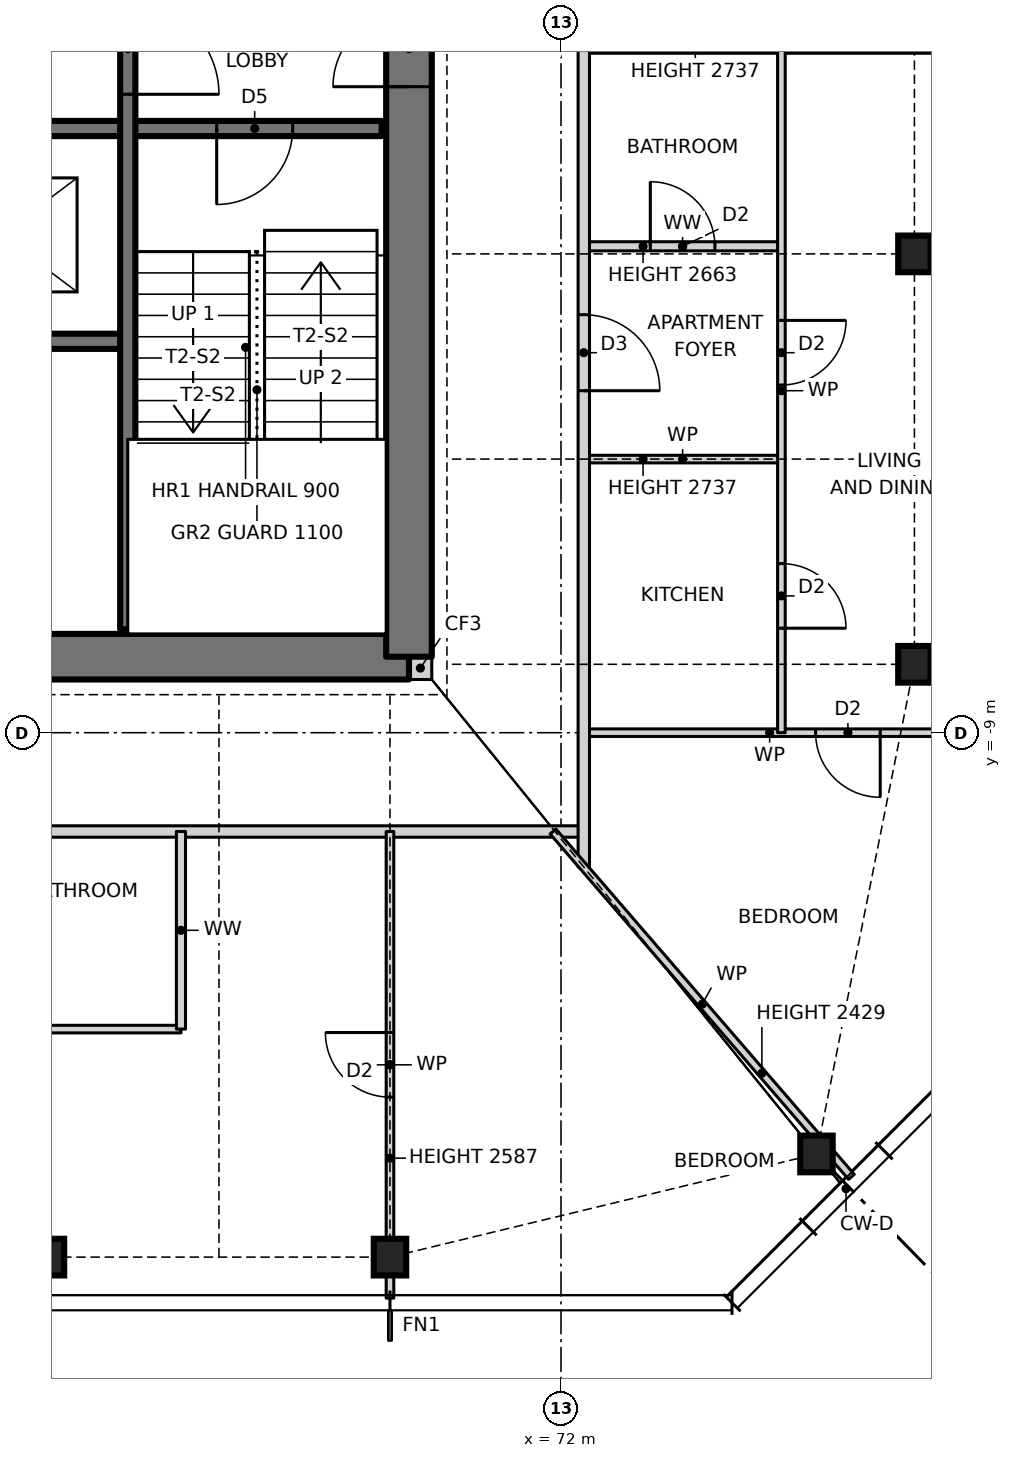
"""IFC4 building model, lengths in metres.
Left out: names, types, materials, properties, quantities, classifications, styles, units other than length and angle.
Written with IfcOpenShell. Run it as: python <this file> out.ifc"""

import sys

from ifc_helpers import new_model, si_unit, direction, frame, frame_2d, origin, origin_2d, place, context, subcontext, project, spatial, rectangle, i_section, extrude, element, fill, save


model = new_model("IFC4")
c1 = context("Model", 3, precision=1e-05, world=origin(), true_north=direction((0.0, 1.0)))
c2 = subcontext(c1, "Body", "Model", "MODEL_VIEW")
j1 = project(units=[si_unit("LENGTHUNIT", "METRE"), si_unit("PLANEANGLEUNIT", "RADIAN")], contexts=[c1])
p1 = place(None, origin())
s1 = spatial("IfcSite", under=j1, at=p1, CompositionType="ELEMENT")
p2 = place(p1, origin())
s2 = spatial("IfcBuilding", under=s1, at=p2, CompositionType="ELEMENT")
p3 = place(p2, frame((0.0, 0.0, 108.5)))
s3 = spatial("IfcBuildingStorey", under=s2, at=p3, CompositionType="ELEMENT", Elevation=108.5)
for number, where, z_axis, x_axis in (
    (1, (65.25, -15.9, 0.0), (0.0, 0.0, 1.0), (1.0, 0.0, 0.0)),
    (2, (69.75, -15.9, 0.0), (0.0, 0.0, 1.0), (1.0, 0.0, 0.0)),
    (3, (75.361, -14.543, 0.0), (0.0, 0.0, 1.0), (1.0, 0.0, 0.0)),
    (4, (76.65, -8.1, 0.0), (0.0, 0.0, 1.0), (1.0, 0.0, 0.0)),
    (5, (76.65, -2.7, 0.0), (0.0, 0.0, 1.0), (1.0, 0.0, 0.0)),
):
    element("IfcColumn", number, at=place(p3, frame(where, z_axis=z_axis, x_axis=x_axis)), inside=s3, PredefinedType="COLUMN", context=c2, shape_type="SweptSolid", body=[
        extrude(i_section(OverallWidth=0.427, OverallDepth=0.483, WebThickness=0.051, FlangeThickness=0.082, at=origin_2d()), origin(), (0.0, 0.0, 1.0), 3.5),
    ])
p4 = place(p3, frame((70.0, -8.15, 0.0), z_axis=(0.0, 0.0, 1.0), x_axis=(1.0, 0.0, 0.0)))
e6 = element("IfcWall", 6, at=p4, inside=s3, PredefinedType="SOLIDWALL", context=c2, shape_type="SweptSolid", body=[
    extrude(rectangle(XDim=0.3, YDim=0.3, at=frame_2d((0.15, 0.0))), origin(), (0.0, 0.0, 1.0), 3.5),
])
p5 = place(p3, frame((56.0, -8.0, 0.0), z_axis=(0.0, 0.0, 1.0), x_axis=(1.0, 0.0, 0.0)))
e7 = element("IfcWall", 7, at=p5, inside=s3, PredefinedType="SHEAR", context=c2, shape_type="SweptSolid", body=[
    extrude(rectangle(XDim=14.0, YDim=0.6, at=frame_2d((7.0, 0.0))), origin(), (0.0, 0.0, 1.0), 3.5),
])
p6 = place(p5, frame((2.7, 0.0, 0.0)))
e8 = element("IfcOpeningElement", 8, at=p6, cuts=e7, PredefinedType="OPENING", context=c2, shape_type="SweptSolid", body=[
    extrude(rectangle(XDim=0.9, YDim=2.1, at=frame_2d((0.45, 1.05))), frame((0.0, 0.31, 0.0), z_axis=(0.0, -1.0, 0.0), x_axis=(1.0, 0.0, 0.0)), (0.0, 0.0, 1.0), 0.62),
])
p7 = place(p5, frame((7.7, 0.0, 0.0)))
e9 = element("IfcOpeningElement", 9, at=p7, cuts=e7, PredefinedType="OPENING", context=c2, shape_type="SweptSolid", body=[
    extrude(rectangle(XDim=0.9, YDim=2.1, at=frame_2d((0.45, 1.05))), frame((0.0, 0.31, 0.0), z_axis=(0.0, -1.0, 0.0), x_axis=(1.0, 0.0, 0.0)), (0.0, 0.0, 1.0), 0.62),
])
p8 = place(p3, frame((70.0, -8.0, 0.0), z_axis=(0.0, 0.0, 1.0), x_axis=(0.0, 1.0, 0.0)))
e10 = element("IfcWall", 10, at=p8, inside=s3, PredefinedType="SHEAR", context=c2, shape_type="SweptSolid", body=[
    extrude(rectangle(XDim=16.0, YDim=0.6, at=frame_2d((8.0, 0.0))), origin(), (0.0, 0.0, 1.0), 3.5),
])
p9 = place(p8, frame((7.5, 0.0, 0.0)))
e11 = element("IfcOpeningElement", 11, at=p9, cuts=e10, PredefinedType="OPENING", context=c2, shape_type="SweptSolid", body=[
    extrude(rectangle(XDim=1.0, YDim=2.1, at=frame_2d((0.5, 1.05))), frame((0.0, 0.31, 0.0), z_axis=(0.0, -1.0, 0.0), x_axis=(1.0, 0.0, 0.0)), (0.0, 0.0, 1.0), 0.62),
])
p10 = place(p3, frame((58.0, -12.9, 0.0), z_axis=(0.0, 0.0, 1.0), x_axis=(1.0, 0.0, 0.0)))
e12 = element("IfcWall", 12, at=p10, inside=s3, PredefinedType="PARTITIONING", context=c2, shape_type="SweptSolid", body=[
    extrude(rectangle(XDim=9.0, YDim=0.1, at=frame_2d((4.5, 0.0))), origin(), (0.0, 0.0, 1.0), 3.27),
])
p11 = place(p10, frame((1.375, 0.0, 0.0)))
e13 = element("IfcOpeningElement", 13, at=p11, cuts=e12, PredefinedType="OPENING", context=c2, shape_type="SweptSolid", body=[
    extrude(rectangle(XDim=0.85, YDim=2.1, at=frame_2d((0.425, 1.05))), frame((0.0, 0.06, 0.0), z_axis=(0.0, -1.0, 0.0), x_axis=(1.0, 0.0, 0.0)), (0.0, 0.0, 1.0), 0.12),
])
p12 = place(p10, frame((4.575, 0.0, 0.0)))
e14 = element("IfcOpeningElement", 14, at=p12, cuts=e12, PredefinedType="OPENING", context=c2, shape_type="SweptSolid", body=[
    extrude(rectangle(XDim=0.85, YDim=2.1, at=frame_2d((0.425, 1.05))), frame((0.0, 0.06, 0.0), z_axis=(0.0, -1.0, 0.0), x_axis=(1.0, 0.0, 0.0)), (0.0, 0.0, 1.0), 0.12),
])
p13 = place(p3, frame((53.7, -10.3, 0.0), z_axis=(0.0, 0.0, 1.0), x_axis=(1.0, 0.0, 0.0)))
e15 = element("IfcWall", 15, at=p13, inside=s3, PredefinedType="PARTITIONING", context=c2, shape_type="SweptSolid", body=[
    extrude(rectangle(XDim=18.6, YDim=0.15, at=frame_2d((9.3, 0.0))), origin(), (0.0, 0.0, 1.0), 3.27),
])
p14 = place(p13, frame((8.8, 0.0, 0.0)))
e16 = element("IfcOpeningElement", 16, at=p14, cuts=e15, PredefinedType="OPENING", context=c2, shape_type="SweptSolid", body=[
    extrude(rectangle(XDim=1.0, YDim=2.1, at=frame_2d((0.5, 1.05))), frame((0.0, 0.085, 0.0), z_axis=(0.0, -1.0, 0.0), x_axis=(1.0, 0.0, 0.0)), (0.0, 0.0, 1.0), 0.17),
])
p15 = place(p3, frame((72.3, -9.0, 0.0), z_axis=(0.0, 0.0, 1.0), x_axis=(1.0, 0.0, 0.0)))
e17 = element("IfcWall", 17, at=p15, inside=s3, PredefinedType="PARTITIONING", context=c2, shape_type="SweptSolid", body=[
    extrude(rectangle(XDim=4.89, YDim=0.1, at=frame_2d((2.445, 0.0))), origin(), (0.0, 0.0, 1.0), 3.27),
])
p16 = place(p15, frame((3.05, 0.0, 0.0)))
e18 = element("IfcOpeningElement", 18, at=p16, cuts=e17, PredefinedType="OPENING", context=c2, shape_type="SweptSolid", body=[
    extrude(rectangle(XDim=0.85, YDim=2.1, at=frame_2d((0.425, 1.05))), frame((0.0, 0.06, 0.0), z_axis=(0.0, -1.0, 0.0), x_axis=(1.0, 0.0, 0.0)), (0.0, 0.0, 1.0), 0.12),
])
p17 = place(p3, frame((72.3, -5.4, 0.0), z_axis=(0.0, 0.0, 1.0), x_axis=(1.0, 0.0, 0.0)))
e19 = element("IfcWall", 19, at=p17, inside=s3, PredefinedType="PARTITIONING", context=c2, shape_type="SweptSolid", body=[
    extrude(rectangle(XDim=2.6, YDim=0.1, at=frame_2d((1.3, 0.0))), origin(), (0.0, 0.0, 1.0), 2.737),
])
p18 = place(p3, frame((56.36, -3.85, 0.0), z_axis=(0.0, 0.0, 1.0), x_axis=(1.0, 0.0, 0.0)))
e20 = element("IfcWall", 20, at=p18, inside=s3, PredefinedType="SOLIDWALL", context=c2, shape_type="SweptSolid", body=[
    extrude(rectangle(XDim=9.94, YDim=0.2, at=frame_2d((4.97, 0.0))), origin(), (0.0, 0.0, 1.0), 3.5),
])
p19 = place(p3, frame((72.3, -2.6, 0.0), z_axis=(0.0, 0.0, 1.0), x_axis=(1.0, 0.0, 0.0)))
e21 = element("IfcWall", 21, at=p19, inside=s3, PredefinedType="PARTITIONING", context=c2, shape_type="SweptSolid", body=[
    extrude(rectangle(XDim=2.6, YDim=0.12, at=frame_2d((1.3, 0.0))), origin(), (0.0, 0.0, 1.0), 2.663),
])
p20 = place(p19, frame((0.875, 0.0, 0.0)))
e22 = element("IfcOpeningElement", 22, at=p20, cuts=e21, PredefinedType="OPENING", context=c2, shape_type="SweptSolid", body=[
    extrude(rectangle(XDim=0.85, YDim=2.1, at=frame_2d((0.425, 1.05))), frame((0.0, 0.07, 0.0), z_axis=(0.0, -1.0, 0.0), x_axis=(1.0, 0.0, 0.0)), (0.0, 0.0, 1.0), 0.14),
])
p21 = place(p3, frame((56.36, -1.05, 0.0), z_axis=(0.0, 0.0, 1.0), x_axis=(1.0, 0.0, 0.0)))
e23 = element("IfcWall", 23, at=p21, inside=s3, PredefinedType="SOLIDWALL", context=c2, shape_type="SweptSolid", body=[
    extrude(rectangle(XDim=13.28, YDim=0.2, at=frame_2d((6.64, 0.0))), origin(), (0.0, 0.0, 1.0), 3.5),
])
p22 = place(p21, frame((11.11, 0.0, 0.0)))
e24 = element("IfcOpeningElement", 24, at=p22, cuts=e23, PredefinedType="OPENING", context=c2, shape_type="SweptSolid", body=[
    extrude(rectangle(XDim=1.0, YDim=2.1, at=frame_2d((0.5, 1.05))), frame((0.0, 0.11, 0.0), z_axis=(0.0, -1.0, 0.0), x_axis=(1.0, 0.0, 0.0)), (0.0, 0.0, 1.0), 0.22),
])
p23 = place(p21, frame((1.087, 0.0, 0.0)))
e25 = element("IfcOpeningElement", 25, at=p23, cuts=e23, PredefinedType="OPENING", context=c2, shape_type="SweptSolid", body=[
    extrude(rectangle(XDim=1.1, YDim=2.1, at=frame_2d((0.55, 1.05))), frame((0.0, 0.11, 0.0), z_axis=(0.0, -1.0, 0.0), x_axis=(1.0, 0.0, 0.0)), (0.0, 0.0, 1.0), 0.22),
])
p24 = place(p21, frame((4.39, 0.0, 0.0)))
e26 = element("IfcOpeningElement", 26, at=p24, cuts=e23, PredefinedType="OPENING", context=c2, shape_type="SweptSolid", body=[
    extrude(rectangle(XDim=1.1, YDim=2.1, at=frame_2d((0.55, 1.05))), frame((0.0, 0.11, 0.0), z_axis=(0.0, -1.0, 0.0), x_axis=(1.0, 0.0, 0.0)), (0.0, 0.0, 1.0), 0.22),
])
p25 = place(p21, frame((7.724, 0.0, 0.0)))
e27 = element("IfcOpeningElement", 27, at=p25, cuts=e23, PredefinedType="OPENING", context=c2, shape_type="SweptSolid", body=[
    extrude(rectangle(XDim=1.1, YDim=2.1, at=frame_2d((0.55, 1.05))), frame((0.0, 0.11, 0.0), z_axis=(0.0, -1.0, 0.0), x_axis=(1.0, 0.0, 0.0)), (0.0, 0.0, 1.0), 0.22),
])
p26 = place(p3, frame((72.3, 0.0, 0.0), z_axis=(0.0, 0.0, 1.0), x_axis=(1.0, 0.0, 0.0)))
e28 = element("IfcWall", 28, at=p26, inside=s3, PredefinedType="PARTITIONING", context=c2, shape_type="SweptSolid", body=[
    extrude(rectangle(XDim=4.89, YDim=0.12, at=frame_2d((2.445, 0.0))), origin(), (0.0, 0.0, 1.0), 2.737),
])
p27 = place(p26, frame((3.32, 0.0, 0.0)))
e29 = element("IfcOpeningElement", 29, at=p27, cuts=e28, PredefinedType="OPENING", context=c2, shape_type="SweptSolid", body=[
    extrude(rectangle(XDim=0.85, YDim=2.1, at=frame_2d((0.425, 1.05))), frame((0.0, 0.07, 0.0), z_axis=(0.0, -1.0, 0.0), x_axis=(1.0, 0.0, 0.0)), (0.0, 0.0, 1.0), 0.14),
])
p28 = place(p3, frame((74.9, -9.0, 0.0), z_axis=(0.0, 0.0, 1.0), x_axis=(0.0, 1.0, 0.0)))
e30 = element("IfcWall", 30, at=p28, inside=s3, PredefinedType="PARTITIONING", context=c2, shape_type="SweptSolid", body=[
    extrude(rectangle(XDim=9.0, YDim=0.1, at=frame_2d((4.5, 0.0))), origin(), (0.0, 0.0, 1.0), 3.27),
])
p29 = place(p28, frame((1.375, 0.0, 0.0)))
e31 = element("IfcOpeningElement", 31, at=p29, cuts=e30, PredefinedType="OPENING", context=c2, shape_type="SweptSolid", body=[
    extrude(rectangle(XDim=0.85, YDim=2.1, at=frame_2d((0.425, 1.05))), frame((0.0, 0.06, 0.0), z_axis=(0.0, -1.0, 0.0), x_axis=(1.0, 0.0, 0.0)), (0.0, 0.0, 1.0), 0.12),
])
p30 = place(p28, frame((4.575, 0.0, 0.0)))
e32 = element("IfcOpeningElement", 32, at=p30, cuts=e30, PredefinedType="OPENING", context=c2, shape_type="SweptSolid", body=[
    extrude(rectangle(XDim=0.85, YDim=2.1, at=frame_2d((0.425, 1.05))), frame((0.0, 0.06, 0.0), z_axis=(0.0, -1.0, 0.0), x_axis=(1.0, 0.0, 0.0)), (0.0, 0.0, 1.0), 0.12),
])
p31 = place(p3, frame((72.3, -10.768, 0.0), z_axis=(0.0, 0.0, 1.0), x_axis=(0.0, 1.0, 0.0)))
e33 = element("IfcWall", 33, at=p31, inside=s3, PredefinedType="PARTITIONING", context=c2, shape_type="SweptSolid", body=[
    extrude(rectangle(XDim=21.668, YDim=0.15, at=frame_2d((10.834, 0.0))), origin(), (0.0, 0.0, 1.0), 3.27),
])
p32 = place(p31, frame((6.268, 0.0, 0.0)))
e34 = element("IfcOpeningElement", 34, at=p32, cuts=e33, PredefinedType="OPENING", context=c2, shape_type="SweptSolid", body=[
    extrude(rectangle(XDim=1.0, YDim=2.1, at=frame_2d((0.5, 1.05))), frame((0.0, 0.085, 0.0), z_axis=(0.0, -1.0, 0.0), x_axis=(1.0, 0.0, 0.0)), (0.0, 0.0, 1.0), 0.17),
])
p33 = place(p31, frame((16.168, 0.0, 0.0)))
e35 = element("IfcOpeningElement", 35, at=p33, cuts=e33, PredefinedType="OPENING", context=c2, shape_type="SweptSolid", body=[
    extrude(rectangle(XDim=1.0, YDim=2.1, at=frame_2d((0.5, 1.05))), frame((0.0, 0.085, 0.0), z_axis=(0.0, -1.0, 0.0), x_axis=(1.0, 0.0, 0.0)), (0.0, 0.0, 1.0), 0.17),
])
p34 = place(p3, frame((69.75, -16.44, 0.0), z_axis=(0.0, 0.0, 1.0), x_axis=(0.0, 1.0, 0.0)))
e36 = element("IfcWall", 36, at=p34, inside=s3, PredefinedType="PARTITIONING", context=c2, shape_type="SweptSolid", body=[
    extrude(rectangle(XDim=6.14, YDim=0.1, at=frame_2d((3.07, 0.0))), origin(), (0.0, 0.0, 1.0), 2.587),
])
p35 = place(p34, frame((2.645, 0.0, 0.0)))
e37 = element("IfcOpeningElement", 37, at=p35, cuts=e36, PredefinedType="OPENING", context=c2, shape_type="SweptSolid", body=[
    extrude(rectangle(XDim=0.85, YDim=2.1, at=frame_2d((0.425, 1.05))), frame((0.0, 0.06, 0.0), z_axis=(0.0, -1.0, 0.0), x_axis=(1.0, 0.0, 0.0)), (0.0, 0.0, 1.0), 0.12),
])
p36 = place(p3, frame((67.0, -12.9, 0.0), z_axis=(0.0, 0.0, 1.0), x_axis=(0.0, 1.0, 0.0)))
e38 = element("IfcWall", 38, at=p36, inside=s3, PredefinedType="PARTITIONING", context=c2, shape_type="SweptSolid", body=[
    extrude(rectangle(XDim=2.6, YDim=0.12, at=frame_2d((1.3, 0.0))), origin(), (0.0, 0.0, 1.0), 3.27),
])
p37 = place(p3, frame((66.3, -7.64, 0.0), z_axis=(0.0, 0.0, 1.0), x_axis=(0.0, 1.0, 0.0)))
e39 = element("IfcWall", 39, at=p37, inside=s3, PredefinedType="SOLIDWALL", context=c2, shape_type="SweptSolid", body=[
    extrude(rectangle(XDim=11.49, YDim=0.2, at=frame_2d((5.745, 0.0))), origin(), (0.0, 0.0, 1.0), 3.5),
])
p38 = place(p37, frame((7.04, 0.0, 0.0)))
e40 = element("IfcOpeningElement", 40, at=p38, cuts=e39, PredefinedType="OPENING", context=c2, shape_type="SweptSolid", body=[
    extrude(rectangle(XDim=1.2, YDim=2.1, at=frame_2d((0.6, 1.05))), frame((0.0, 0.11, 0.0), z_axis=(0.0, -1.0, 0.0), x_axis=(1.0, 0.0, 0.0)), (0.0, 0.0, 1.0), 0.22),
])
p39 = place(p3, frame((75.821, -14.844, 0.0), z_axis=(0.0, 0.0, 1.0), x_axis=(-0.65378286253, 0.756682211144, 0.0)))
e41 = element("IfcWall", 41, at=p39, inside=s3, PredefinedType="PARTITIONING", context=c2, shape_type="SweptSolid", body=[
    extrude(rectangle(XDim=6.005, YDim=0.1, at=frame_2d((3.002, 0.0))), origin(), (0.0, 0.0, 1.0), 2.429),
])
p40 = place(p22, frame((1.0, 0.0, 0.0), z_axis=(0.0, 0.0, 1.0), x_axis=(-1.0, 0.0, 0.0)))
e42 = element("IfcDoor", 42, at=p40, inside=s3, OperationType="SINGLE_SWING_RIGHT", PredefinedType="DOOR", context=c2, shape_type="SweptSolid", body=[
    extrude(rectangle(XDim=1.0, YDim=2.1, at=frame_2d((0.5, 1.05))), frame((0.0, 0.025, 0.0), z_axis=(0.0, -1.0, 0.0), x_axis=(1.0, 0.0, 0.0)), (0.0, 0.0, 1.0), 0.05),
])
fill(e24, e42)
p41 = place(p38, frame((1.2, 0.0, 0.0), z_axis=(0.0, 0.0, 1.0), x_axis=(-1.0, 0.0, 0.0)))
e43 = element("IfcDoor", 43, at=p41, inside=s3, OperationType="SINGLE_SWING_RIGHT", PredefinedType="DOOR", context=c2, shape_type="SweptSolid", body=[
    extrude(rectangle(XDim=1.2, YDim=2.1, at=frame_2d((0.6, 1.05))), frame((0.0, 0.025, 0.0), z_axis=(0.0, -1.0, 0.0), x_axis=(1.0, 0.0, 0.0)), (0.0, 0.0, 1.0), 0.05),
])
fill(e40, e43)
p42 = place(p35, origin())
e44 = element("IfcDoor", 44, at=p42, inside=s3, OperationType="SINGLE_SWING_RIGHT", PredefinedType="DOOR", context=c2, shape_type="SweptSolid", body=[
    extrude(rectangle(XDim=0.85, YDim=2.1, at=frame_2d((0.425, 1.05))), frame((0.0, 0.025, 0.0), z_axis=(0.0, -1.0, 0.0), x_axis=(1.0, 0.0, 0.0)), (0.0, 0.0, 1.0), 0.05),
])
fill(e37, e44)
p43 = place(p29, frame((0.85, 0.0, 0.0), z_axis=(0.0, 0.0, 1.0), x_axis=(-1.0, 0.0, 0.0)))
e45 = element("IfcDoor", 45, at=p43, inside=s3, OperationType="SINGLE_SWING_RIGHT", PredefinedType="DOOR", context=c2, shape_type="SweptSolid", body=[
    extrude(rectangle(XDim=0.85, YDim=2.1, at=frame_2d((0.425, 1.05))), frame((0.0, 0.025, 0.0), z_axis=(0.0, -1.0, 0.0), x_axis=(1.0, 0.0, 0.0)), (0.0, 0.0, 1.0), 0.05),
])
fill(e31, e45)
p44 = place(p32, frame((1.0, 0.0, 0.0), z_axis=(0.0, 0.0, 1.0), x_axis=(-1.0, 0.0, 0.0)))
e46 = element("IfcDoor", 46, at=p44, inside=s3, OperationType="SINGLE_SWING_RIGHT", PredefinedType="DOOR", context=c2, shape_type="SweptSolid", body=[
    extrude(rectangle(XDim=1.0, YDim=2.1, at=frame_2d((0.5, 1.05))), frame((0.0, 0.025, 0.0), z_axis=(0.0, -1.0, 0.0), x_axis=(1.0, 0.0, 0.0)), (0.0, 0.0, 1.0), 0.05),
])
fill(e34, e46)
p45 = place(p30, frame((0.85, 0.0, 0.0), z_axis=(0.0, 0.0, 1.0), x_axis=(-1.0, 0.0, 0.0)))
e47 = element("IfcDoor", 47, at=p45, inside=s3, OperationType="SINGLE_SWING_LEFT", PredefinedType="DOOR", context=c2, shape_type="SweptSolid", body=[
    extrude(rectangle(XDim=0.85, YDim=2.1, at=frame_2d((0.425, 1.05))), frame((0.0, 0.025, 0.0), z_axis=(0.0, -1.0, 0.0), x_axis=(1.0, 0.0, 0.0)), (0.0, 0.0, 1.0), 0.05),
])
fill(e32, e47)
p46 = place(p20, origin())
e48 = element("IfcDoor", 48, at=p46, inside=s3, OperationType="SINGLE_SWING_LEFT", PredefinedType="DOOR", context=c2, shape_type="SweptSolid", body=[
    extrude(rectangle(XDim=0.85, YDim=2.1, at=frame_2d((0.425, 1.05))), frame((0.0, 0.025, 0.0), z_axis=(0.0, -1.0, 0.0), x_axis=(1.0, 0.0, 0.0)), (0.0, 0.0, 1.0), 0.05),
])
fill(e22, e48)
p47 = place(p16, frame((0.85, 0.0, 0.0), z_axis=(0.0, 0.0, 1.0), x_axis=(-1.0, 0.0, 0.0)))
e49 = element("IfcDoor", 49, at=p47, inside=s3, OperationType="SINGLE_SWING_LEFT", PredefinedType="DOOR", context=c2, shape_type="SweptSolid", body=[
    extrude(rectangle(XDim=0.85, YDim=2.1, at=frame_2d((0.425, 1.05))), frame((0.0, 0.025, 0.0), z_axis=(0.0, -1.0, 0.0), x_axis=(1.0, 0.0, 0.0)), (0.0, 0.0, 1.0), 0.05),
])
fill(e18, e49)
p48 = place(p9, origin())
e50 = element("IfcDoor", 50, at=p48, inside=s3, OperationType="SINGLE_SWING_LEFT", PredefinedType="DOOR", context=c2, shape_type="SweptSolid", body=[
    extrude(rectangle(XDim=1.0, YDim=2.1, at=frame_2d((0.5, 1.05))), frame((0.0, 0.025, 0.0), z_axis=(0.0, -1.0, 0.0), x_axis=(1.0, 0.0, 0.0)), (0.0, 0.0, 1.0), 0.05),
])
fill(e11, e50)
save(model, sys.argv[1])
